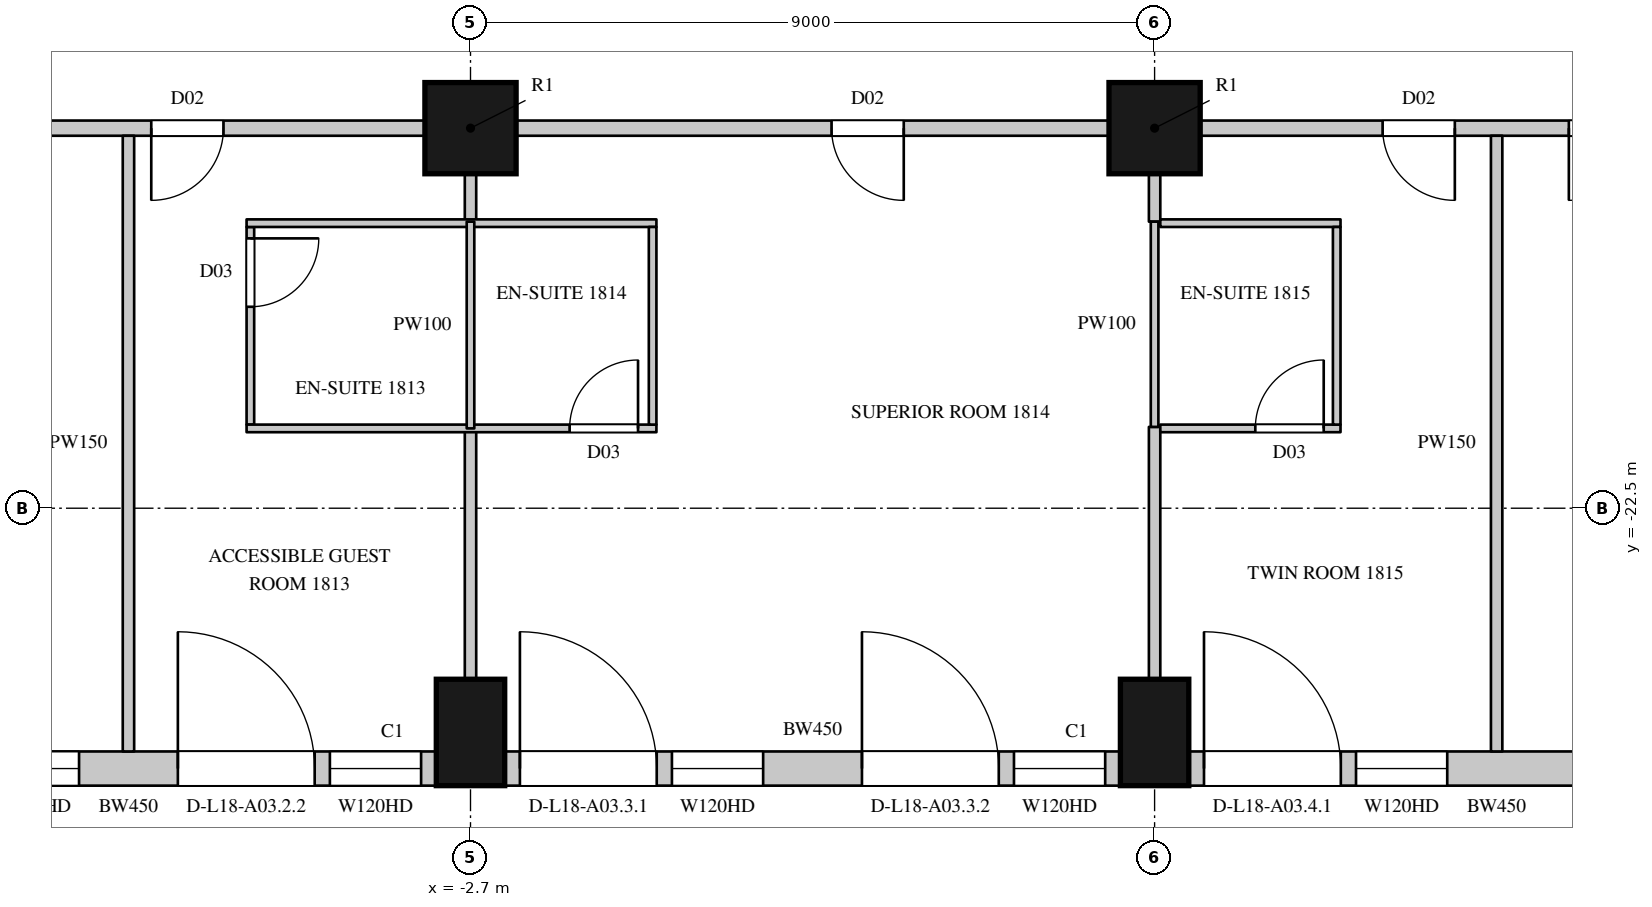
"""IFC4 building model, lengths in metres.
Left out: names, types, materials, properties, quantities, classifications, styles, units other than length and angle.
Written with IfcOpenShell. Run it as: python <this file> out.ifc"""

import sys

from ifc_helpers import new_model, si_unit, direction, frame, frame_2d, origin, origin_2d, place, context, subcontext, project, spatial, rectangle, circle, extrude, element, fill, save


model = new_model("IFC4")
c1 = context("Model", 3, precision=1e-05, world=origin(), true_north=direction((0.0, 1.0)))
c2 = subcontext(c1, "Body", "Model", "MODEL_VIEW")
j1 = project(units=[si_unit("LENGTHUNIT", "METRE"), si_unit("PLANEANGLEUNIT", "RADIAN")], contexts=[c1])
p1 = place(None, origin())
s1 = spatial("IfcSite", under=j1, at=p1, CompositionType="ELEMENT")
p2 = place(p1, origin())
s2 = spatial("IfcBuilding", under=s1, at=p2, CompositionType="ELEMENT")
p3 = place(p2, frame((0.0, 0.0, 95.1)))
s3 = spatial("IfcBuildingStorey", under=s2, at=p3, CompositionType="ELEMENT", Elevation=95.1)
for number, where, z_axis, x_axis in (
    (1, (-2.7, -25.45, 0.0), (0.0, 0.0, 1.0), (1.0, 0.0, 0.0)),
    (2, (6.3, -25.45, 0.0), (0.0, 0.0, 1.0), (1.0, 0.0, 0.0)),
):
    element("IfcColumn", number, at=place(p3, frame(where, z_axis=z_axis, x_axis=x_axis)), inside=s3, PredefinedType="COLUMN", context=c2, shape_type="SweptSolid", body=[
        extrude(rectangle(XDim=0.9, YDim=1.4, at=origin_2d()), origin(), (0.0, 0.0, 1.0), 3.6),
    ])
for number, where, z_axis, x_axis in (
    (3, (-2.7, -17.5, 0.0), (0.0, 0.0, 1.0), (1.0, 0.0, 0.0)),
    (4, (6.3, -17.5, 0.0), (0.0, 0.0, 1.0), (1.0, 0.0, 0.0)),
):
    element("IfcColumn", number, at=place(p3, frame(where, z_axis=z_axis, x_axis=x_axis)), inside=s3, PredefinedType="COLUMN", context=c2, shape_type="SweptSolid", body=[
        extrude(circle(Radius=0.6, at=origin_2d()), origin(), (0.0, 0.0, 1.0), 3.6),
    ])
p4 = place(p3, frame((-11.25, -25.925, 0.0), z_axis=(0.0, 0.0, 1.0), x_axis=(1.0, 0.0, 0.0)))
e5 = element("IfcWall", 5, at=p4, inside=s3, PredefinedType="SOLIDWALL", context=c2, shape_type="SweptSolid", body=[
    extrude(rectangle(XDim=8.1, YDim=0.45, at=frame_2d((4.05, 0.0))), origin(), (0.0, 0.0, 1.0), 3.3),
])
p5 = place(p4, frame((0.2, 0.0, 0.0)))
e6 = element("IfcOpeningElement", 6, at=p5, cuts=e5, PredefinedType="OPENING", context=c2, shape_type="SweptSolid", body=[
    extrude(rectangle(XDim=1.8, YDim=2.4, at=frame_2d((0.9, 1.2))), frame((0.0, 0.235, 0.0), z_axis=(0.0, -1.0, 0.0), x_axis=(1.0, 0.0, 0.0)), (0.0, 0.0, 1.0), 0.47),
])
p6 = place(p4, frame((2.2, 0.0, 1.05)))
e7 = element("IfcOpeningElement", 7, at=p6, cuts=e5, PredefinedType="OPENING", context=c2, shape_type="SweptSolid", body=[
    extrude(rectangle(XDim=1.2, YDim=2.0, at=frame_2d((0.6, 1.0))), frame((0.0, 0.235, 0.0), z_axis=(0.0, -1.0, 0.0), x_axis=(1.0, 0.0, 0.0)), (0.0, 0.0, 1.0), 0.47),
])
p7 = place(p4, frame((4.7, 0.0, 0.0)))
e8 = element("IfcOpeningElement", 8, at=p7, cuts=e5, PredefinedType="OPENING", context=c2, shape_type="SweptSolid", body=[
    extrude(rectangle(XDim=1.8, YDim=2.4, at=frame_2d((0.9, 1.2))), frame((0.0, 0.235, 0.0), z_axis=(0.0, -1.0, 0.0), x_axis=(1.0, 0.0, 0.0)), (0.0, 0.0, 1.0), 0.47),
])
p8 = place(p4, frame((6.7, 0.0, 1.05)))
e9 = element("IfcOpeningElement", 9, at=p8, cuts=e5, PredefinedType="OPENING", context=c2, shape_type="SweptSolid", body=[
    extrude(rectangle(XDim=1.2, YDim=2.0, at=frame_2d((0.6, 1.0))), frame((0.0, 0.235, 0.0), z_axis=(0.0, -1.0, 0.0), x_axis=(1.0, 0.0, 0.0)), (0.0, 0.0, 1.0), 0.47),
])
p9 = place(p3, frame((-2.25, -25.925, 0.0), z_axis=(0.0, 0.0, 1.0), x_axis=(1.0, 0.0, 0.0)))
e10 = element("IfcWall", 10, at=p9, inside=s3, PredefinedType="SOLIDWALL", context=c2, shape_type="SweptSolid", body=[
    extrude(rectangle(XDim=8.1, YDim=0.45, at=frame_2d((4.05, 0.0))), origin(), (0.0, 0.0, 1.0), 3.3),
])
p10 = place(p9, frame((0.2, 0.0, 0.0)))
e11 = element("IfcOpeningElement", 11, at=p10, cuts=e10, PredefinedType="OPENING", context=c2, shape_type="SweptSolid", body=[
    extrude(rectangle(XDim=1.8, YDim=2.4, at=frame_2d((0.9, 1.2))), frame((0.0, 0.235, 0.0), z_axis=(0.0, -1.0, 0.0), x_axis=(1.0, 0.0, 0.0)), (0.0, 0.0, 1.0), 0.47),
])
p11 = place(p9, frame((2.2, 0.0, 1.05)))
e12 = element("IfcOpeningElement", 12, at=p11, cuts=e10, PredefinedType="OPENING", context=c2, shape_type="SweptSolid", body=[
    extrude(rectangle(XDim=1.2, YDim=2.0, at=frame_2d((0.6, 1.0))), frame((0.0, 0.235, 0.0), z_axis=(0.0, -1.0, 0.0), x_axis=(1.0, 0.0, 0.0)), (0.0, 0.0, 1.0), 0.47),
])
p12 = place(p9, frame((4.7, 0.0, 0.0)))
e13 = element("IfcOpeningElement", 13, at=p12, cuts=e10, PredefinedType="OPENING", context=c2, shape_type="SweptSolid", body=[
    extrude(rectangle(XDim=1.8, YDim=2.4, at=frame_2d((0.9, 1.2))), frame((0.0, 0.235, 0.0), z_axis=(0.0, -1.0, 0.0), x_axis=(1.0, 0.0, 0.0)), (0.0, 0.0, 1.0), 0.47),
])
p13 = place(p9, frame((6.7, 0.0, 1.05)))
e14 = element("IfcOpeningElement", 14, at=p13, cuts=e10, PredefinedType="OPENING", context=c2, shape_type="SweptSolid", body=[
    extrude(rectangle(XDim=1.2, YDim=2.0, at=frame_2d((0.6, 1.0))), frame((0.0, 0.235, 0.0), z_axis=(0.0, -1.0, 0.0), x_axis=(1.0, 0.0, 0.0)), (0.0, 0.0, 1.0), 0.47),
])
p14 = place(p3, frame((6.75, -25.925, 0.0), z_axis=(0.0, 0.0, 1.0), x_axis=(1.0, 0.0, 0.0)))
e15 = element("IfcWall", 15, at=p14, inside=s3, PredefinedType="SOLIDWALL", context=c2, shape_type="SweptSolid", body=[
    extrude(rectangle(XDim=8.1, YDim=0.45, at=frame_2d((4.05, 0.0))), origin(), (0.0, 0.0, 1.0), 3.3),
])
p15 = place(p14, frame((0.2, 0.0, 0.0)))
e16 = element("IfcOpeningElement", 16, at=p15, cuts=e15, PredefinedType="OPENING", context=c2, shape_type="SweptSolid", body=[
    extrude(rectangle(XDim=1.8, YDim=2.4, at=frame_2d((0.9, 1.2))), frame((0.0, 0.235, 0.0), z_axis=(0.0, -1.0, 0.0), x_axis=(1.0, 0.0, 0.0)), (0.0, 0.0, 1.0), 0.47),
])
p16 = place(p14, frame((2.2, 0.0, 1.05)))
e17 = element("IfcOpeningElement", 17, at=p16, cuts=e15, PredefinedType="OPENING", context=c2, shape_type="SweptSolid", body=[
    extrude(rectangle(XDim=1.2, YDim=2.0, at=frame_2d((0.6, 1.0))), frame((0.0, 0.235, 0.0), z_axis=(0.0, -1.0, 0.0), x_axis=(1.0, 0.0, 0.0)), (0.0, 0.0, 1.0), 0.47),
])
p17 = place(p14, frame((5.4, 0.0, 0.0)))
e18 = element("IfcOpeningElement", 18, at=p17, cuts=e15, PredefinedType="OPENING", context=c2, shape_type="SweptSolid", body=[
    extrude(rectangle(XDim=1.8, YDim=2.4, at=frame_2d((0.9, 1.2))), frame((0.0, 0.235, 0.0), z_axis=(0.0, -1.0, 0.0), x_axis=(1.0, 0.0, 0.0)), (0.0, 0.0, 1.0), 0.47),
])
p18 = place(p3, frame((-11.1, -17.5, 0.0), z_axis=(0.0, 0.0, 1.0), x_axis=(1.0, 0.0, 0.0)))
e19 = element("IfcWall", 19, at=p18, inside=s3, PredefinedType="PARTITIONING", context=c2, shape_type="SweptSolid", body=[
    extrude(rectangle(XDim=7.8, YDim=0.2, at=frame_2d((3.9, 0.0))), origin(), (0.0, 0.0, 1.0), 2.75),
])
p19 = place(p18, frame((4.2, 0.0, 0.0)))
e20 = element("IfcOpeningElement", 20, at=p19, cuts=e19, PredefinedType="OPENING", context=c2, shape_type="SweptSolid", body=[
    extrude(rectangle(XDim=0.95, YDim=2.2, at=frame_2d((0.475, 1.1))), frame((0.0, 0.11, 0.0), z_axis=(0.0, -1.0, 0.0), x_axis=(1.0, 0.0, 0.0)), (0.0, 0.0, 1.0), 0.22),
])
p20 = place(p3, frame((-2.1, -17.5, 0.0), z_axis=(0.0, 0.0, 1.0), x_axis=(1.0, 0.0, 0.0)))
e21 = element("IfcWall", 21, at=p20, inside=s3, PredefinedType="PARTITIONING", context=c2, shape_type="SweptSolid", body=[
    extrude(rectangle(XDim=7.8, YDim=0.2, at=frame_2d((3.9, 0.0))), origin(), (0.0, 0.0, 1.0), 2.75),
])
p21 = place(p20, frame((4.15, 0.0, 0.0)))
e22 = element("IfcOpeningElement", 22, at=p21, cuts=e21, PredefinedType="OPENING", context=c2, shape_type="SweptSolid", body=[
    extrude(rectangle(XDim=0.95, YDim=2.2, at=frame_2d((0.475, 1.1))), frame((0.0, 0.11, 0.0), z_axis=(0.0, -1.0, 0.0), x_axis=(1.0, 0.0, 0.0)), (0.0, 0.0, 1.0), 0.22),
])
p22 = place(p3, frame((6.9, -17.5, 0.0), z_axis=(0.0, 0.0, 1.0), x_axis=(1.0, 0.0, 0.0)))
e23 = element("IfcWall", 23, at=p22, inside=s3, PredefinedType="PARTITIONING", context=c2, shape_type="SweptSolid", body=[
    extrude(rectangle(XDim=7.8, YDim=0.2, at=frame_2d((3.9, 0.0))), origin(), (0.0, 0.0, 1.0), 2.75),
])
p23 = place(p22, frame((2.4, 0.0, 0.0)))
e24 = element("IfcOpeningElement", 24, at=p23, cuts=e23, PredefinedType="OPENING", context=c2, shape_type="SweptSolid", body=[
    extrude(rectangle(XDim=0.95, YDim=2.2, at=frame_2d((0.475, 1.1))), frame((0.0, 0.11, 0.0), z_axis=(0.0, -1.0, 0.0), x_axis=(1.0, 0.0, 0.0)), (0.0, 0.0, 1.0), 0.22),
])
p24 = place(p22, frame((4.85, 0.0, 0.0)))
e25 = element("IfcOpeningElement", 25, at=p24, cuts=e23, PredefinedType="OPENING", context=c2, shape_type="SweptSolid", body=[
    extrude(rectangle(XDim=0.95, YDim=2.2, at=frame_2d((0.475, 1.1))), frame((0.0, 0.11, 0.0), z_axis=(0.0, -1.0, 0.0), x_axis=(1.0, 0.0, 0.0)), (0.0, 0.0, 1.0), 0.22),
])
p25 = place(p3, frame((-7.2, -25.7, 0.0), z_axis=(0.0, 0.0, 1.0), x_axis=(0.0, 1.0, 0.0)))
e26 = element("IfcWall", 26, at=p25, inside=s3, PredefinedType="PARTITIONING", context=c2, shape_type="SweptSolid", body=[
    extrude(rectangle(XDim=8.1, YDim=0.15, at=frame_2d((4.05, 0.0))), origin(), (0.0, 0.0, 1.0), 2.65),
])
p26 = place(p3, frame((-2.7, -24.75, 0.0), z_axis=(0.0, 0.0, 1.0), x_axis=(0.0, 1.0, 0.0)))
e27 = element("IfcWall", 27, at=p26, inside=s3, PredefinedType="PARTITIONING", context=c2, shape_type="SweptSolid", body=[
    extrude(rectangle(XDim=3.3, YDim=0.15, at=frame_2d((1.65, 0.0))), origin(), (0.0, 0.0, 1.0), 2.75),
])
p27 = place(p3, frame((-2.7, -18.73, 0.0), z_axis=(0.0, 0.0, 1.0), x_axis=(0.0, 1.0, 0.0)))
e28 = element("IfcWall", 28, at=p27, inside=s3, PredefinedType="PARTITIONING", context=c2, shape_type="SweptSolid", body=[
    extrude(rectangle(XDim=0.63, YDim=0.15, at=frame_2d((0.315, 0.0))), origin(), (0.0, 0.0, 1.0), 2.75),
])
p28 = place(p3, frame((6.3, -24.75, 0.0), z_axis=(0.0, 0.0, 1.0), x_axis=(0.0, 1.0, 0.0)))
e29 = element("IfcWall", 29, at=p28, inside=s3, PredefinedType="PARTITIONING", context=c2, shape_type="SweptSolid", body=[
    extrude(rectangle(XDim=3.32, YDim=0.15, at=frame_2d((1.66, 0.0))), origin(), (0.0, 0.0, 1.0), 2.75),
])
p29 = place(p3, frame((6.3, -18.73, 0.0), z_axis=(0.0, 0.0, 1.0), x_axis=(0.0, 1.0, 0.0)))
e30 = element("IfcWall", 30, at=p29, inside=s3, PredefinedType="PARTITIONING", context=c2, shape_type="SweptSolid", body=[
    extrude(rectangle(XDim=0.63, YDim=0.15, at=frame_2d((0.315, 0.0))), origin(), (0.0, 0.0, 1.0), 2.75),
])
p30 = place(p3, frame((10.8, -25.7, 0.0), z_axis=(0.0, 0.0, 1.0), x_axis=(0.0, 1.0, 0.0)))
e31 = element("IfcWall", 31, at=p30, inside=s3, PredefinedType="PARTITIONING", context=c2, shape_type="SweptSolid", body=[
    extrude(rectangle(XDim=8.1, YDim=0.15, at=frame_2d((4.05, 0.0))), origin(), (0.0, 0.0, 1.0), 2.65),
])
p31 = place(p3, frame((-5.596, -21.4, 0.0), z_axis=(0.0, 0.0, 1.0), x_axis=(0.0, 1.0, 0.0)))
e32 = element("IfcWall", 32, at=p31, inside=s3, PredefinedType="PARTITIONING", context=c2, shape_type="SweptSolid", body=[
    extrude(rectangle(XDim=2.6, YDim=0.1, at=frame_2d((1.3, 0.0))), origin(), (0.0, 0.0, 1.0), 3.3),
])
p32 = place(p31, frame((1.55, 0.0, 0.0)))
e33 = element("IfcOpeningElement", 33, at=p32, cuts=e32, PredefinedType="OPENING", context=c2, shape_type="SweptSolid", body=[
    extrude(rectangle(XDim=0.9, YDim=2.2, at=frame_2d((0.45, 1.1))), frame((0.0, 0.06, 0.0), z_axis=(0.0, -1.0, 0.0), x_axis=(1.0, 0.0, 0.0)), (0.0, 0.0, 1.0), 0.12),
])
p33 = place(p3, frame((-5.646, -21.45, 0.0), z_axis=(0.0, 0.0, 1.0), x_axis=(1.0, 0.0, 0.0)))
e34 = element("IfcWall", 34, at=p33, inside=s3, PredefinedType="PARTITIONING", context=c2, shape_type="SweptSolid", body=[
    extrude(rectangle(XDim=5.392, YDim=0.1, at=frame_2d((2.696, 0.0))), origin(), (0.0, 0.0, 1.0), 3.3),
])
p34 = place(p33, frame((4.25, 0.0, 0.0)))
e35 = element("IfcOpeningElement", 35, at=p34, cuts=e34, PredefinedType="OPENING", context=c2, shape_type="SweptSolid", body=[
    extrude(rectangle(XDim=0.9, YDim=2.2, at=frame_2d((0.45, 1.1))), frame((0.0, 0.06, 0.0), z_axis=(0.0, -1.0, 0.0), x_axis=(1.0, 0.0, 0.0)), (0.0, 0.0, 1.0), 0.12),
])
p35 = place(p3, frame((-5.646, -18.75, 0.0), z_axis=(0.0, 0.0, 1.0), x_axis=(1.0, 0.0, 0.0)))
e36 = element("IfcWall", 36, at=p35, inside=s3, PredefinedType="PARTITIONING", context=c2, shape_type="SweptSolid", body=[
    extrude(rectangle(XDim=5.392, YDim=0.1, at=frame_2d((2.696, 0.0))), origin(), (0.0, 0.0, 1.0), 3.3),
])
p36 = place(p3, frame((-2.7, -21.45, 0.0), z_axis=(0.0, 0.0, 1.0), x_axis=(0.0, 1.0, 0.0)))
e37 = element("IfcWall", 37, at=p36, inside=s3, PredefinedType="PARTITIONING", context=c2, shape_type="SweptSolid", body=[
    extrude(rectangle(XDim=2.72, YDim=0.1, at=frame_2d((1.36, 0.0))), origin(), (0.0, 0.0, 1.0), 2.75),
])
p37 = place(p3, frame((-0.304, -21.4, 0.0), z_axis=(0.0, 0.0, 1.0), x_axis=(0.0, 1.0, 0.0)))
e38 = element("IfcWall", 38, at=p37, inside=s3, PredefinedType="PARTITIONING", context=c2, shape_type="SweptSolid", body=[
    extrude(rectangle(XDim=2.6, YDim=0.1, at=frame_2d((1.3, 0.0))), origin(), (0.0, 0.0, 1.0), 3.3),
])
p38 = place(p3, frame((6.3, -21.43, 0.0), z_axis=(0.0, 0.0, 1.0), x_axis=(0.0, 1.0, 0.0)))
e39 = element("IfcWall", 39, at=p38, inside=s3, PredefinedType="PARTITIONING", context=c2, shape_type="SweptSolid", body=[
    extrude(rectangle(XDim=2.7, YDim=0.1, at=frame_2d((1.35, 0.0))), origin(), (0.0, 0.0, 1.0), 2.75),
])
p39 = place(p3, frame((6.375, -21.45, 0.0), z_axis=(0.0, 0.0, 1.0), x_axis=(1.0, 0.0, 0.0)))
e40 = element("IfcWall", 40, at=p39, inside=s3, PredefinedType="PARTITIONING", context=c2, shape_type="SweptSolid", body=[
    extrude(rectangle(XDim=2.371, YDim=0.1, at=frame_2d((1.186, 0.0))), origin(), (0.0, 0.0, 1.0), 3.3),
])
p40 = place(p39, frame((1.25, 0.0, 0.0)))
e41 = element("IfcOpeningElement", 41, at=p40, cuts=e40, PredefinedType="OPENING", context=c2, shape_type="SweptSolid", body=[
    extrude(rectangle(XDim=0.9, YDim=2.2, at=frame_2d((0.45, 1.1))), frame((0.0, 0.06, 0.0), z_axis=(0.0, -1.0, 0.0), x_axis=(1.0, 0.0, 0.0)), (0.0, 0.0, 1.0), 0.12),
])
p41 = place(p3, frame((6.375, -18.75, 0.0), z_axis=(0.0, 0.0, 1.0), x_axis=(1.0, 0.0, 0.0)))
e42 = element("IfcWall", 42, at=p41, inside=s3, PredefinedType="PARTITIONING", context=c2, shape_type="SweptSolid", body=[
    extrude(rectangle(XDim=2.371, YDim=0.1, at=frame_2d((1.186, 0.0))), origin(), (0.0, 0.0, 1.0), 3.3),
])
p42 = place(p3, frame((8.696, -21.4, 0.0), z_axis=(0.0, 0.0, 1.0), x_axis=(0.0, 1.0, 0.0)))
e43 = element("IfcWall", 43, at=p42, inside=s3, PredefinedType="PARTITIONING", context=c2, shape_type="SweptSolid", body=[
    extrude(rectangle(XDim=2.6, YDim=0.1, at=frame_2d((1.3, 0.0))), origin(), (0.0, 0.0, 1.0), 3.3),
])
p43 = place(p6, origin())
e44 = element("IfcWindow", 44, at=p43, inside=s3, PartitioningType="SINGLE_PANEL", PredefinedType="WINDOW", context=c2, shape_type="SweptSolid", body=[
    extrude(rectangle(XDim=1.2, YDim=2.0, at=frame_2d((0.6, 1.0))), frame((0.0, 0.135, 0.0), z_axis=(0.0, -1.0, 0.0), x_axis=(1.0, 0.0, 0.0)), (0.0, 0.0, 1.0), 0.06),
])
fill(e7, e44)
p44 = place(p7, origin())
e45 = element("IfcDoor", 45, at=p44, inside=s3, OperationType="SLIDING_TO_LEFT", PredefinedType="DOOR", context=c2, shape_type="SweptSolid", body=[
    extrude(rectangle(XDim=1.8, YDim=2.4, at=frame_2d((0.9, 1.2))), frame((0.0, 0.13, 0.0), z_axis=(0.0, -1.0, 0.0), x_axis=(1.0, 0.0, 0.0)), (0.0, 0.0, 1.0), 0.05),
])
fill(e8, e45)
p45 = place(p8, origin())
e46 = element("IfcWindow", 46, at=p45, inside=s3, PartitioningType="SINGLE_PANEL", PredefinedType="WINDOW", context=c2, shape_type="SweptSolid", body=[
    extrude(rectangle(XDim=1.2, YDim=2.0, at=frame_2d((0.6, 1.0))), frame((0.0, 0.135, 0.0), z_axis=(0.0, -1.0, 0.0), x_axis=(1.0, 0.0, 0.0)), (0.0, 0.0, 1.0), 0.06),
])
fill(e9, e46)
p46 = place(p10, origin())
e47 = element("IfcDoor", 47, at=p46, inside=s3, OperationType="SLIDING_TO_LEFT", PredefinedType="DOOR", context=c2, shape_type="SweptSolid", body=[
    extrude(rectangle(XDim=1.8, YDim=2.4, at=frame_2d((0.9, 1.2))), frame((0.0, 0.13, 0.0), z_axis=(0.0, -1.0, 0.0), x_axis=(1.0, 0.0, 0.0)), (0.0, 0.0, 1.0), 0.05),
])
fill(e11, e47)
p47 = place(p11, origin())
e48 = element("IfcWindow", 48, at=p47, inside=s3, PartitioningType="SINGLE_PANEL", PredefinedType="WINDOW", context=c2, shape_type="SweptSolid", body=[
    extrude(rectangle(XDim=1.2, YDim=2.0, at=frame_2d((0.6, 1.0))), frame((0.0, 0.135, 0.0), z_axis=(0.0, -1.0, 0.0), x_axis=(1.0, 0.0, 0.0)), (0.0, 0.0, 1.0), 0.06),
])
fill(e12, e48)
p48 = place(p12, origin())
e49 = element("IfcDoor", 49, at=p48, inside=s3, OperationType="SLIDING_TO_LEFT", PredefinedType="DOOR", context=c2, shape_type="SweptSolid", body=[
    extrude(rectangle(XDim=1.8, YDim=2.4, at=frame_2d((0.9, 1.2))), frame((0.0, 0.13, 0.0), z_axis=(0.0, -1.0, 0.0), x_axis=(1.0, 0.0, 0.0)), (0.0, 0.0, 1.0), 0.05),
])
fill(e13, e49)
p49 = place(p13, origin())
e50 = element("IfcWindow", 50, at=p49, inside=s3, PartitioningType="SINGLE_PANEL", PredefinedType="WINDOW", context=c2, shape_type="SweptSolid", body=[
    extrude(rectangle(XDim=1.2, YDim=2.0, at=frame_2d((0.6, 1.0))), frame((0.0, 0.135, 0.0), z_axis=(0.0, -1.0, 0.0), x_axis=(1.0, 0.0, 0.0)), (0.0, 0.0, 1.0), 0.06),
])
fill(e14, e50)
p50 = place(p15, origin())
e51 = element("IfcDoor", 51, at=p50, inside=s3, OperationType="SLIDING_TO_LEFT", PredefinedType="DOOR", context=c2, shape_type="SweptSolid", body=[
    extrude(rectangle(XDim=1.8, YDim=2.4, at=frame_2d((0.9, 1.2))), frame((0.0, 0.13, 0.0), z_axis=(0.0, -1.0, 0.0), x_axis=(1.0, 0.0, 0.0)), (0.0, 0.0, 1.0), 0.05),
])
fill(e16, e51)
p51 = place(p16, origin())
e52 = element("IfcWindow", 52, at=p51, inside=s3, PartitioningType="SINGLE_PANEL", PredefinedType="WINDOW", context=c2, shape_type="SweptSolid", body=[
    extrude(rectangle(XDim=1.2, YDim=2.0, at=frame_2d((0.6, 1.0))), frame((0.0, 0.135, 0.0), z_axis=(0.0, -1.0, 0.0), x_axis=(1.0, 0.0, 0.0)), (0.0, 0.0, 1.0), 0.06),
])
fill(e17, e52)
p52 = place(p19, origin())
e53 = element("IfcDoor", 53, at=p52, inside=s3, OperationType="SINGLE_SWING_RIGHT", PredefinedType="DOOR", context=c2, shape_type="SweptSolid", body=[
    extrude(rectangle(XDim=0.95, YDim=2.2, at=frame_2d((0.475, 1.1))), frame((0.0, 0.025, 0.0), z_axis=(0.0, -1.0, 0.0), x_axis=(1.0, 0.0, 0.0)), (0.0, 0.0, 1.0), 0.05),
])
fill(e20, e53)
p53 = place(p32, origin())
e54 = element("IfcDoor", 54, at=p53, inside=s3, OperationType="SINGLE_SWING_LEFT", PredefinedType="DOOR", context=c2, shape_type="SweptSolid", body=[
    extrude(rectangle(XDim=0.9, YDim=2.2, at=frame_2d((0.45, 1.1))), frame((0.0, 0.025, 0.0), z_axis=(0.0, -1.0, 0.0), x_axis=(1.0, 0.0, 0.0)), (0.0, 0.0, 1.0), 0.05),
])
fill(e33, e54)
p54 = place(p21, origin())
e55 = element("IfcDoor", 55, at=p54, inside=s3, OperationType="SINGLE_SWING_LEFT", PredefinedType="DOOR", context=c2, shape_type="SweptSolid", body=[
    extrude(rectangle(XDim=0.95, YDim=2.2, at=frame_2d((0.475, 1.1))), frame((0.0, 0.025, 0.0), z_axis=(0.0, -1.0, 0.0), x_axis=(1.0, 0.0, 0.0)), (0.0, 0.0, 1.0), 0.05),
])
fill(e22, e55)
p55 = place(p34, origin())
e56 = element("IfcDoor", 56, at=p55, inside=s3, OperationType="SINGLE_SWING_RIGHT", PredefinedType="DOOR", context=c2, shape_type="SweptSolid", body=[
    extrude(rectangle(XDim=0.9, YDim=2.2, at=frame_2d((0.45, 1.1))), frame((0.0, 0.025, 0.0), z_axis=(0.0, -1.0, 0.0), x_axis=(1.0, 0.0, 0.0)), (0.0, 0.0, 1.0), 0.05),
])
fill(e35, e56)
p56 = place(p23, origin())
e57 = element("IfcDoor", 57, at=p56, inside=s3, OperationType="SINGLE_SWING_LEFT", PredefinedType="DOOR", context=c2, shape_type="SweptSolid", body=[
    extrude(rectangle(XDim=0.95, YDim=2.2, at=frame_2d((0.475, 1.1))), frame((0.0, 0.025, 0.0), z_axis=(0.0, -1.0, 0.0), x_axis=(1.0, 0.0, 0.0)), (0.0, 0.0, 1.0), 0.05),
])
fill(e24, e57)
p57 = place(p40, origin())
e58 = element("IfcDoor", 58, at=p57, inside=s3, OperationType="SINGLE_SWING_RIGHT", PredefinedType="DOOR", context=c2, shape_type="SweptSolid", body=[
    extrude(rectangle(XDim=0.9, YDim=2.2, at=frame_2d((0.45, 1.1))), frame((0.0, 0.025, 0.0), z_axis=(0.0, -1.0, 0.0), x_axis=(1.0, 0.0, 0.0)), (0.0, 0.0, 1.0), 0.05),
])
fill(e41, e58)
p58 = place(p24, origin())
e59 = element("IfcDoor", 59, at=p58, inside=s3, OperationType="SINGLE_SWING_RIGHT", PredefinedType="DOOR", context=c2, shape_type="SweptSolid", body=[
    extrude(rectangle(XDim=0.95, YDim=2.2, at=frame_2d((0.475, 1.1))), frame((0.0, 0.025, 0.0), z_axis=(0.0, -1.0, 0.0), x_axis=(1.0, 0.0, 0.0)), (0.0, 0.0, 1.0), 0.05),
])
fill(e25, e59)
save(model, sys.argv[1])
